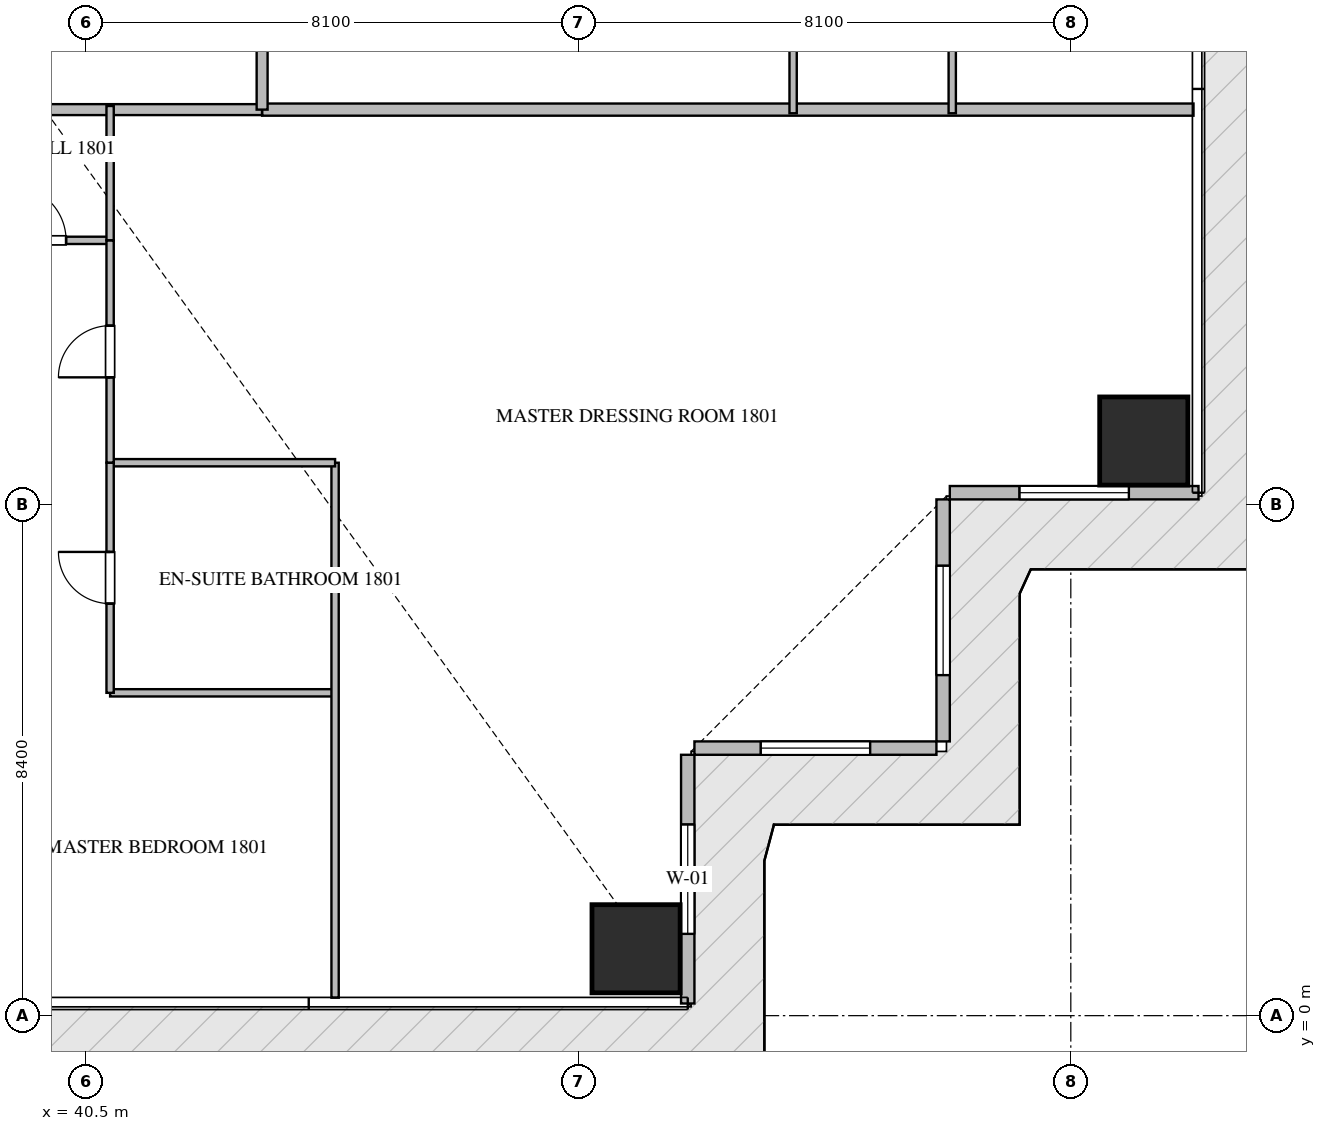
"""IFC4 building model, lengths in metres.
Left out: names, types, materials, properties, quantities, classifications, styles, units other than length and angle.
Written with IfcOpenShell. Run it as: python <this file> out.ifc"""

import sys

from ifc_helpers import new_model, si_unit, direction, frame, frame_2d, origin, origin_2d, place, context, subcontext, project, spatial, rectangle, extrude, source, transform, mapped, element, fill, save


model = new_model("IFC4")
c1 = context("Model", 3, precision=1e-05, world=origin(), true_north=direction((0.0, 1.0)))
c2 = subcontext(c1, "Body", "Model", "MODEL_VIEW")
j1 = project(units=[si_unit("LENGTHUNIT", "METRE"), si_unit("PLANEANGLEUNIT", "RADIAN")], contexts=[c1])
p1 = place(None, origin())
s1 = spatial("IfcSite", under=j1, at=p1, CompositionType="ELEMENT")
p2 = place(p1, origin())
s2 = spatial("IfcBuilding", under=s1, at=p2, CompositionType="ELEMENT")
p3 = place(p2, frame((0.0, 0.0, 75.45)))
s3 = spatial("IfcBuildingStorey", under=s2, at=p3, CompositionType="ELEMENT", Elevation=75.45)
m1 = source(origin(), c2, "Body", "SweptSolid", [
    extrude(rectangle(XDim=1.45, YDim=1.45, at=origin_2d()), origin(), (0.0, 0.0, 1.0), 3.75),
])
for number, where, z_axis, x_axis in (
    (1, (49.55, 1.1, -0.26), (0.0, 0.0, 1.0), (1.0, 0.0, 0.0)),
    (2, (57.9, 9.45, -0.26), (0.0, 0.0, 1.0), (1.0, 0.0, 0.0)),
):
    element("IfcColumn", number, at=place(p3, frame(where, z_axis=z_axis, x_axis=x_axis)), inside=s3, PredefinedType="COLUMN", context=c2, shape_type="MappedRepresentation", body=[
        mapped(m1, transform((0.0, 0.0, 0.0), scale=1.0)),
    ])
p4 = place(p3, frame((50.4, 0.2, 0.0), z_axis=(0.0, 0.0, 1.0), x_axis=(0.0, 1.0, 0.0)))
e3 = element("IfcWall", 3, at=p4, inside=s3, PredefinedType="ELEMENTEDWALL", context=c2, shape_type="SweptSolid", body=[
    extrude(rectangle(XDim=4.09, YDim=0.22, at=frame_2d((2.045, 0.0))), origin(), (0.0, 0.0, 1.0), 3.475),
])
p5 = place(p4, frame((1.145, 0.0, 0.65)))
e4 = element("IfcOpeningElement", 4, at=p5, cuts=e3, PredefinedType="OPENING", context=c2, shape_type="SweptSolid", body=[
    extrude(rectangle(XDim=1.8, YDim=2.1, at=frame_2d((0.9, 1.05))), frame((0.0, 0.12, 0.0), z_axis=(0.0, -1.0, 0.0), x_axis=(1.0, 0.0, 0.0)), (0.0, 0.0, 1.0), 0.24),
])
p6 = place(p3, frame((50.51, 4.4, 0.0), z_axis=(0.0, 0.0, 1.0), x_axis=(1.0, 0.0, 0.0)))
e5 = element("IfcWall", 5, at=p6, inside=s3, PredefinedType="ELEMENTEDWALL", context=c2, shape_type="SweptSolid", body=[
    extrude(rectangle(XDim=3.98, YDim=0.22, at=frame_2d((1.99, 0.0))), origin(), (0.0, 0.0, 1.0), 3.475),
])
p7 = place(p6, frame((1.09, 0.0, 0.65)))
e6 = element("IfcOpeningElement", 6, at=p7, cuts=e5, PredefinedType="OPENING", context=c2, shape_type="SweptSolid", body=[
    extrude(rectangle(XDim=1.8, YDim=2.1, at=frame_2d((0.9, 1.05))), frame((0.0, 0.12, 0.0), z_axis=(0.0, -1.0, 0.0), x_axis=(1.0, 0.0, 0.0)), (0.0, 0.0, 1.0), 0.24),
])
p8 = place(p3, frame((54.6, 4.51, 0.0), z_axis=(0.0, 0.0, 1.0), x_axis=(0.0, 1.0, 0.0)))
e7 = element("IfcWall", 7, at=p8, inside=s3, PredefinedType="ELEMENTEDWALL", context=c2, shape_type="SweptSolid", body=[
    extrude(rectangle(XDim=3.98, YDim=0.22, at=frame_2d((1.99, 0.0))), origin(), (0.0, 0.0, 1.0), 3.475),
])
p9 = place(p8, frame((1.09, 0.0, 0.65)))
e8 = element("IfcOpeningElement", 8, at=p9, cuts=e7, PredefinedType="OPENING", context=c2, shape_type="SweptSolid", body=[
    extrude(rectangle(XDim=1.8, YDim=2.1, at=frame_2d((0.9, 1.05))), frame((0.0, 0.12, 0.0), z_axis=(0.0, -1.0, 0.0), x_axis=(1.0, 0.0, 0.0)), (0.0, 0.0, 1.0), 0.24),
])
p10 = place(p3, frame((54.71, 8.6, 0.0), z_axis=(0.0, 0.0, 1.0), x_axis=(1.0, 0.0, 0.0)))
e9 = element("IfcWall", 9, at=p10, inside=s3, PredefinedType="ELEMENTEDWALL", context=c2, shape_type="SweptSolid", body=[
    extrude(rectangle(XDim=4.09, YDim=0.22, at=frame_2d((2.045, 0.0))), origin(), (0.0, 0.0, 1.0), 3.475),
])
p11 = place(p10, frame((1.145, 0.0, 0.65)))
e10 = element("IfcOpeningElement", 10, at=p11, cuts=e9, PredefinedType="OPENING", context=c2, shape_type="SweptSolid", body=[
    extrude(rectangle(XDim=1.8, YDim=2.1, at=frame_2d((0.9, 1.05))), frame((0.0, 0.12, 0.0), z_axis=(0.0, -1.0, 0.0), x_axis=(1.0, 0.0, 0.0)), (0.0, 0.0, 1.0), 0.24),
])
p12 = place(p3, frame((43.4, 14.9, 0.0), z_axis=(0.0, 0.0, 1.0), x_axis=(1.0, 0.0, 0.0)))
e11 = element("IfcWall", 11, at=p12, inside=s3, PredefinedType="PARTITIONING", context=c2, shape_type="SweptSolid", body=[
    extrude(rectangle(XDim=15.318, YDim=0.2, at=frame_2d((7.659, 0.0))), origin(), (0.0, 0.0, 1.0), 3.49),
])
p13 = place(p3, frame((21.402, 14.9, 0.0), z_axis=(0.0, 0.0, 1.0), x_axis=(1.0, 0.0, 0.0)))
e12 = element("IfcWall", 12, at=p13, inside=s3, PredefinedType="PARTITIONING", context=c2, shape_type="SweptSolid", body=[
    extrude(rectangle(XDim=21.996, YDim=0.18, at=frame_2d((10.998, 0.0))), origin(), (0.0, 0.0, 1.0), 3.49),
])
p14 = place(p13, frame((7.202, 0.0, 0.0)))
e13 = element("IfcOpeningElement", 13, at=p14, cuts=e12, PredefinedType="OPENING", context=c2, shape_type="SweptSolid", body=[
    extrude(rectangle(XDim=1.0, YDim=2.15, at=frame_2d((0.5, 1.075))), frame((0.0, 0.1, 0.0), z_axis=(0.0, -1.0, 0.0), x_axis=(1.0, 0.0, 0.0)), (0.0, 0.0, 1.0), 0.2),
])
p15 = place(p3, frame((43.4, 14.9, 0.0), z_axis=(0.0, 0.0, 1.0), x_axis=(0.0, 1.0, 0.0)))
e14 = element("IfcWall", 14, at=p15, inside=s3, PredefinedType="PARTITIONING", context=c2, shape_type="SweptSolid", body=[
    extrude(rectangle(XDim=20.6, YDim=0.18, at=frame_2d((10.3, 0.0))), origin(), (0.0, 0.0, 1.0), 3.49),
])
p16 = place(p15, frame((17.64, 0.0, 0.0)))
e15 = element("IfcOpeningElement", 15, at=p16, cuts=e14, PredefinedType="OPENING", context=c2, shape_type="SweptSolid", body=[
    extrude(rectangle(XDim=1.0, YDim=2.15, at=frame_2d((0.5, 1.075))), frame((0.0, 0.1, 0.0), z_axis=(0.0, -1.0, 0.0), x_axis=(1.0, 0.0, 0.0)), (0.0, 0.0, 1.0), 0.2),
])
p17 = place(p3, frame((38.552, 12.75, 0.0), z_axis=(0.0, 0.0, 1.0), x_axis=(1.0, 0.0, 0.0)))
e16 = element("IfcWall", 16, at=p17, inside=s3, PredefinedType="PARTITIONING", context=c2, shape_type="SweptSolid", body=[
    extrude(rectangle(XDim=2.348, YDim=0.12, at=frame_2d((1.174, 0.0))), origin(), (0.0, 0.0, 1.0), 3.49),
])
p18 = place(p17, frame((0.724, 0.0, 0.0)))
e17 = element("IfcOpeningElement", 17, at=p18, cuts=e16, PredefinedType="OPENING", context=c2, shape_type="SweptSolid", body=[
    extrude(rectangle(XDim=0.9, YDim=2.1, at=frame_2d((0.45, 1.05))), frame((0.0, 0.07, 0.0), z_axis=(0.0, -1.0, 0.0), x_axis=(1.0, 0.0, 0.0)), (0.0, 0.0, 1.0), 0.14),
])
p19 = place(p3, frame((40.9, 5.309, 0.0), z_axis=(0.0, 0.0, 1.0), x_axis=(1.0, 0.0, 0.0)))
e18 = element("IfcWall", 18, at=p19, inside=s3, PredefinedType="PARTITIONING", context=c2, shape_type="SweptSolid", body=[
    extrude(rectangle(XDim=3.7, YDim=0.12, at=frame_2d((1.85, 0.0))), origin(), (0.0, 0.0, 1.0), 3.49),
])
p20 = place(p3, frame((44.6, 0.295, 0.0), z_axis=(0.0, 0.0, 1.0), x_axis=(0.0, 1.0, 0.0)))
e19 = element("IfcWall", 19, at=p20, inside=s3, PredefinedType="PARTITIONING", context=c2, shape_type="SweptSolid", body=[
    extrude(rectangle(XDim=8.798, YDim=0.12, at=frame_2d((4.399, 0.0))), origin(), (0.0, 0.0, 1.0), 3.49),
])
p21 = place(p3, frame((40.9, 9.093, 0.0), z_axis=(0.0, 0.0, 1.0), x_axis=(1.0, 0.0, 0.0)))
e20 = element("IfcWall", 20, at=p21, inside=s3, PredefinedType="PARTITIONING", context=c2, shape_type="SweptSolid", body=[
    extrude(rectangle(XDim=3.7, YDim=0.12, at=frame_2d((1.85, 0.0))), origin(), (0.0, 0.0, 1.0), 3.49),
])
p22 = place(p3, frame((40.9, 5.309, 0.0), z_axis=(0.0, 0.0, 1.0), x_axis=(0.0, 1.0, 0.0)))
e21 = element("IfcWall", 21, at=p22, inside=s3, PredefinedType="PARTITIONING", context=c2, shape_type="SweptSolid", body=[
    extrude(rectangle(XDim=3.784, YDim=0.12, at=frame_2d((1.892, 0.0))), origin(), (0.0, 0.0, 1.0), 3.49),
])
p23 = place(p22, frame((1.467, 0.0, 0.0)))
e22 = element("IfcOpeningElement", 22, at=p23, cuts=e21, PredefinedType="OPENING", context=c2, shape_type="SweptSolid", body=[
    extrude(rectangle(XDim=0.85, YDim=2.1, at=frame_2d((0.425, 1.05))), frame((0.0, 0.07, 0.0), z_axis=(0.0, -1.0, 0.0), x_axis=(1.0, 0.0, 0.0)), (0.0, 0.0, 1.0), 0.14),
])
p24 = place(p3, frame((40.9, 9.095, 0.0), z_axis=(0.0, 0.0, 1.0), x_axis=(0.0, 1.0, 0.0)))
e23 = element("IfcWall", 23, at=p24, inside=s3, PredefinedType="PARTITIONING", context=c2, shape_type="SweptSolid", body=[
    extrude(rectangle(XDim=3.655, YDim=0.12, at=frame_2d((1.828, 0.0))), origin(), (0.0, 0.0, 1.0), 3.49),
])
p25 = place(p24, frame((1.402, 0.0, 0.0)))
e24 = element("IfcOpeningElement", 24, at=p25, cuts=e23, PredefinedType="OPENING", context=c2, shape_type="SweptSolid", body=[
    extrude(rectangle(XDim=0.85, YDim=2.1, at=frame_2d((0.425, 1.05))), frame((0.0, 0.07, 0.0), z_axis=(0.0, -1.0, 0.0), x_axis=(1.0, 0.0, 0.0)), (0.0, 0.0, 1.0), 0.14),
])
p26 = place(p3, frame((40.9, 12.752, 0.0), z_axis=(0.0, 0.0, 1.0), x_axis=(0.0, 1.0, 0.0)))
e25 = element("IfcWall", 25, at=p26, inside=s3, PredefinedType="PARTITIONING", context=c2, shape_type="SweptSolid", body=[
    extrude(rectangle(XDim=2.208, YDim=0.12, at=frame_2d((1.104, 0.0))), origin(), (0.0, 0.0, 1.0), 3.49),
])
for number, where, z_axis, x_axis in (
    (26, (54.75, 14.84, 0.0), (0.0, 0.0, 1.0), (0.0, 1.0, 0.0)),
    (27, (52.133, 14.84, 0.0), (0.0, 0.0, 1.0), (0.0, 1.0, 0.0)),
):
    element("IfcWall", number, at=place(p3, frame(where, z_axis=z_axis, x_axis=x_axis)), inside=s3, PredefinedType="PARTITIONING", context=c2, shape_type="SweptSolid", body=[
        extrude(rectangle(XDim=5.41, YDim=0.12, at=frame_2d((2.705, 0.0))), origin(), (0.0, 0.0, 1.0), 3.49),
    ])
m2 = source(origin(), c2, "Body", "SweptSolid", [
    extrude(rectangle(XDim=1.8, YDim=2.1, at=frame_2d((0.9, 1.05))), frame((0.0, 0.03, 0.0), z_axis=(0.0, -1.0, 0.0), x_axis=(1.0, 0.0, 0.0)), (0.0, 0.0, 1.0), 0.06),
])
p27 = place(p5, origin())
e28 = element("IfcWindow", 28, at=p27, inside=s3, PartitioningType="SINGLE_PANEL", PredefinedType="WINDOW", context=c2, shape_type="MappedRepresentation", body=[
    mapped(m2, transform((0.0, 0.0, 0.0), scale=1.0)),
])
fill(e4, e28)
p28 = place(p7, origin())
e29 = element("IfcWindow", 29, at=p28, inside=s3, PartitioningType="SINGLE_PANEL", PredefinedType="WINDOW", context=c2, shape_type="MappedRepresentation", body=[
    mapped(m2, transform((0.0, 0.0, 0.0), scale=1.0)),
])
fill(e6, e29)
p29 = place(p9, origin())
e30 = element("IfcWindow", 30, at=p29, inside=s3, PartitioningType="SINGLE_PANEL", PredefinedType="WINDOW", context=c2, shape_type="MappedRepresentation", body=[
    mapped(m2, transform((0.0, 0.0, 0.0), scale=1.0)),
])
fill(e8, e30)
p30 = place(p11, origin())
e31 = element("IfcWindow", 31, at=p30, inside=s3, PartitioningType="SINGLE_PANEL", PredefinedType="WINDOW", context=c2, shape_type="MappedRepresentation", body=[
    mapped(m2, transform((0.0, 0.0, 0.0), scale=1.0)),
])
fill(e10, e31)
m3 = source(origin(), c2, "Body", "SweptSolid", [
    extrude(rectangle(XDim=0.9, YDim=2.1, at=frame_2d((0.45, 1.05))), frame((0.0, 0.025, 0.0), z_axis=(0.0, -1.0, 0.0), x_axis=(1.0, 0.0, 0.0)), (0.0, 0.0, 1.0), 0.05),
])
p31 = place(p18, origin())
e32 = element("IfcDoor", 32, at=p31, inside=s3, OperationType="SINGLE_SWING_LEFT", PredefinedType="DOOR", context=c2, shape_type="MappedRepresentation", body=[
    mapped(m3, transform((0.0, 0.0, 0.0), scale=1.0)),
])
fill(e17, e32)
m4 = source(origin(), c2, "Body", "SweptSolid", [
    extrude(rectangle(XDim=0.85, YDim=2.1, at=frame_2d((0.425, 1.05))), frame((0.0, 0.025, 0.0), z_axis=(0.0, -1.0, 0.0), x_axis=(1.0, 0.0, 0.0)), (0.0, 0.0, 1.0), 0.05),
])
p32 = place(p23, origin())
e33 = element("IfcDoor", 33, at=p32, inside=s3, OperationType="SINGLE_SWING_RIGHT", PredefinedType="DOOR", context=c2, shape_type="MappedRepresentation", body=[
    mapped(m4, transform((0.0, 0.0, 0.0), scale=1.0)),
])
fill(e22, e33)
p33 = place(p25, origin())
e34 = element("IfcDoor", 34, at=p33, inside=s3, OperationType="SINGLE_SWING_LEFT", PredefinedType="DOOR", context=c2, shape_type="MappedRepresentation", body=[
    mapped(m4, transform((0.0, 0.0, 0.0), scale=1.0)),
])
fill(e24, e34)
save(model, sys.argv[1])
